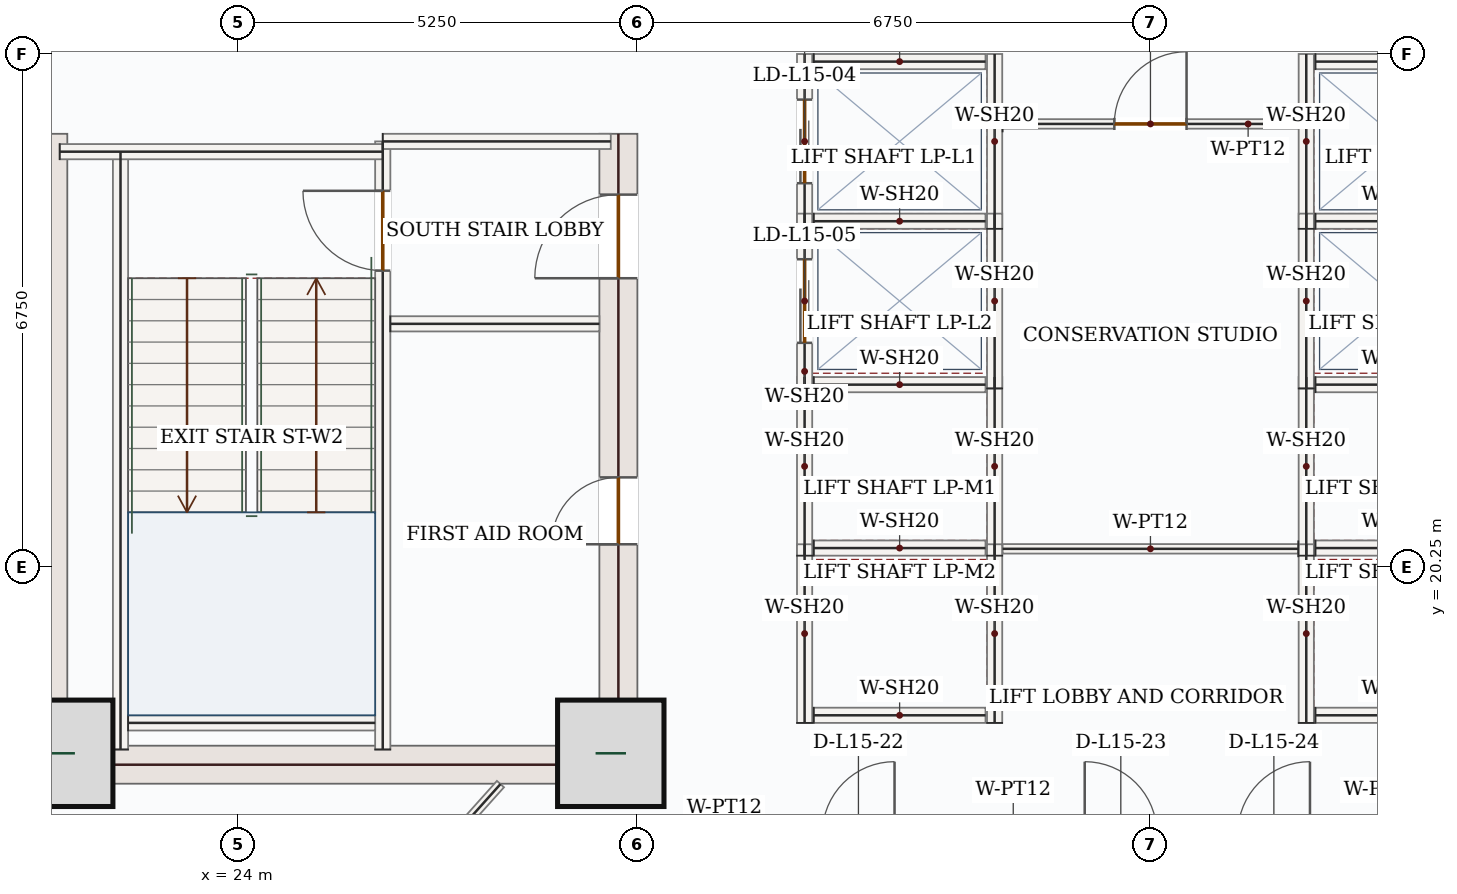
"""IFC4 building model, lengths in metres.
Left out: names, types, materials, properties, quantities, classifications, styles, units other than length and angle.
Written with IfcOpenShell. Run it as: python <this file> out.ifc"""

import sys

from ifc_helpers import new_model, si_unit, direction, frame, frame_2d, origin, origin_2d, place, context, subcontext, project, spatial, rectangle, extrude, source, transform, mapped, element, fill, save


model = new_model("IFC4")
c1 = context("Model", 3, precision=1e-05, world=origin(), true_north=direction((0.0, 1.0)))
c2 = subcontext(c1, "Body", "Model", "MODEL_VIEW")
j1 = project(units=[si_unit("LENGTHUNIT", "METRE"), si_unit("PLANEANGLEUNIT", "RADIAN")], contexts=[c1])
p1 = place(None, origin())
s1 = spatial("IfcSite", under=j1, at=p1, CompositionType="ELEMENT")
p2 = place(p1, origin())
s2 = spatial("IfcBuilding", under=s1, at=p2, CompositionType="ELEMENT")
p3 = place(p2, frame((0.0, 0.0, 71.1)))
s3 = spatial("IfcBuildingStorey", under=s2, at=p3, CompositionType="ELEMENT", Elevation=71.1)
m1 = source(origin(), c2, "Body", "SweptSolid", [
    extrude(rectangle(XDim=8.55, YDim=0.5, at=frame_2d((4.275, 0.0))), origin(), (0.0, 0.0, 1.0), 3.95),
])
p4 = place(p3, frame((21.5, 17.4, 0.0), z_axis=(0.0, 0.0, 1.0), x_axis=(0.0, 1.0, 0.0)))
e1 = element("IfcWall", 1, at=p4, inside=s3, PredefinedType="SHEAR", context=c2, shape_type="MappedRepresentation", body=[
    mapped(m1, transform((0.0, 0.0, 0.0), x_axis=(1.0, 0.0, 0.0), y_axis=(0.0, 1.0, 0.0), z_axis=(0.0, 0.0, 1.0), scale=1.0)),
])
p5 = place(p3, frame((29.0, 17.4, 0.0), z_axis=(0.0, 0.0, 1.0), x_axis=(0.0, 1.0, 0.0)))
e2 = element("IfcWall", 2, at=p5, inside=s3, PredefinedType="SHEAR", context=c2, shape_type="SweptSolid", body=[
    extrude(rectangle(XDim=8.55, YDim=0.5, at=frame_2d((4.275, 0.0))), origin(), (0.0, 0.0, 1.0), 3.95),
])
p6 = place(p5, frame((6.65, 0.0, 0.0)))
e3 = element("IfcOpeningElement", 3, at=p6, cuts=e2, PredefinedType="OPENING", context=c2, shape_type="SweptSolid", body=[
    extrude(rectangle(XDim=1.1, YDim=2.2, at=frame_2d((0.55, 1.1))), frame((0.0, 0.26, 0.0), z_axis=(0.0, -1.0, 0.0), x_axis=(1.0, 0.0, 0.0)), (0.0, 0.0, 1.0), 0.52),
])
p7 = place(p5, frame((3.15, 0.0, 0.0)))
e4 = element("IfcOpeningElement", 4, at=p7, cuts=e2, PredefinedType="OPENING", context=c2, shape_type="SweptSolid", body=[
    extrude(rectangle(XDim=0.88, YDim=2.1, at=frame_2d((0.44, 1.05))), frame((0.0, 0.26, 0.0), z_axis=(0.0, -1.0, 0.0), x_axis=(1.0, 0.0, 0.0)), (0.0, 0.0, 1.0), 0.52),
])
m2 = source(origin(), c2, "Body", "SweptSolid", [
    extrude(rectangle(XDim=7.0, YDim=0.5, at=frame_2d((3.5, 0.0))), origin(), (0.0, 0.0, 1.0), 3.95),
])
p8 = place(p3, frame((21.75, 17.65, 0.0), z_axis=(0.0, 0.0, 1.0), x_axis=(1.0, 0.0, 0.0)))
e5 = element("IfcWall", 5, at=p8, inside=s3, PredefinedType="SHEAR", context=c2, shape_type="MappedRepresentation", body=[
    mapped(m2, transform((0.0, 0.0, 0.0), x_axis=(1.0, 0.0, 0.0), y_axis=(0.0, 1.0, 0.0), z_axis=(0.0, 0.0, 1.0), scale=1.0)),
])
m3 = source(origin(), c2, "Body", "SweptSolid", [
    extrude(rectangle(XDim=1.4, YDim=1.4, at=origin_2d()), origin(), (0.0, 0.0, 1.0), 4.2),
])
for number, where, z_axis, x_axis in (
    (6, (21.65, 17.8, 0.0), (0.0, 0.0, 1.0), (1.0, 0.0, 0.0)),
    (7, (28.9, 17.8, 0.0), (0.0, 0.0, 1.0), (1.0, 0.0, 0.0)),
):
    element("IfcColumn", number, at=place(p3, frame(where, z_axis=z_axis, x_axis=x_axis)), inside=s3, PredefinedType="COLUMN", context=c2, shape_type="MappedRepresentation", body=[
        mapped(m3, transform((0.0, 0.0, 0.0), x_axis=(1.0, 0.0, 0.0), y_axis=(0.0, 1.0, 0.0), z_axis=(0.0, 0.0, 1.0), scale=1.0)),
    ])
p9 = place(p3, frame((22.658, 14.74, 0.0), z_axis=(0.0, 0.0, 1.0), x_axis=(-0.707106781187, 0.707106781187, 0.0)))
e8 = element("IfcWall", 8, at=p9, inside=s3, PredefinedType="SOLIDWALL", context=c2, shape_type="SweptSolid", body=[
    extrude(rectangle(XDim=5.258, YDim=0.32, at=frame_2d((2.629, 0.0))), origin(), (0.0, 0.0, 1.0), 3.95),
])
p10 = place(p9, frame((1.429, 0.0, 0.85)))
e9 = element("IfcOpeningElement", 9, at=p10, cuts=e8, PredefinedType="OPENING", context=c2, shape_type="SweptSolid", body=[
    extrude(rectangle(XDim=2.4, YDim=1.8, at=frame_2d((1.2, 0.9))), frame((0.0, 0.17, 0.0), z_axis=(0.0, -1.0, 0.0), x_axis=(1.0, 0.0, 0.0)), (0.0, 0.0, 1.0), 0.34),
])
m4 = source(origin(), c2, "Body", "SweptSolid", [
    extrude(rectangle(XDim=7.87, YDim=0.2, at=frame_2d((3.935, 0.0))), origin(), (0.0, 0.0, 1.0), 3.95),
])
p11 = place(p3, frame((22.45, 17.85, 0.0), z_axis=(0.0, 0.0, 1.0), x_axis=(0.0, 1.0, 0.0)))
e10 = element("IfcWall", 10, at=p11, inside=s3, PredefinedType="SOLIDWALL", context=c2, shape_type="MappedRepresentation", body=[
    mapped(m4, transform((0.0, 0.0, 0.0), x_axis=(1.0, 0.0, 0.0), y_axis=(0.0, 1.0, 0.0), z_axis=(0.0, 0.0, 1.0), scale=1.0)),
])
p12 = place(p3, frame((25.9, 17.85, 0.0), z_axis=(0.0, 0.0, 1.0), x_axis=(0.0, 1.0, 0.0)))
e11 = element("IfcWall", 11, at=p12, inside=s3, PredefinedType="SOLIDWALL", context=c2, shape_type="SweptSolid", body=[
    extrude(rectangle(XDim=8.0, YDim=0.2, at=frame_2d((4.0, 0.0))), origin(), (0.0, 0.0, 1.0), 3.95),
])
p13 = place(p12, frame((6.3, 0.0, 0.0)))
e12 = element("IfcOpeningElement", 12, at=p13, cuts=e11, PredefinedType="OPENING", context=c2, shape_type="SweptSolid", body=[
    extrude(rectangle(XDim=1.05, YDim=2.15, at=frame_2d((0.525, 1.075))), frame((0.0, 0.11, 0.0), z_axis=(0.0, -1.0, 0.0), x_axis=(1.0, 0.0, 0.0)), (0.0, 0.0, 1.0), 0.22),
])
m5 = source(origin(), c2, "Body", "SweptSolid", [
    extrude(rectangle(XDim=4.25, YDim=0.2, at=frame_2d((2.125, 0.0))), origin(), (0.0, 0.0, 1.0), 3.95),
])
p14 = place(p3, frame((21.65, 25.715, 0.0), z_axis=(0.0, 0.0, 1.0), x_axis=(1.0, 0.0, 0.0)))
e13 = element("IfcWall", 13, at=p14, inside=s3, PredefinedType="SOLIDWALL", context=c2, shape_type="MappedRepresentation", body=[
    mapped(m5, transform((0.0, 0.0, 0.0), x_axis=(1.0, 0.0, 0.0), y_axis=(0.0, 1.0, 0.0), z_axis=(0.0, 0.0, 1.0), scale=1.0)),
])
m6 = source(origin(), c2, "Body", "SweptSolid", [
    extrude(rectangle(XDim=3.0, YDim=0.2, at=frame_2d((1.5, 0.0))), origin(), (0.0, 0.0, 1.0), 3.95),
])
p15 = place(p3, frame((25.9, 25.85, 0.0), z_axis=(0.0, 0.0, 1.0), x_axis=(1.0, 0.0, 0.0)))
e14 = element("IfcWall", 14, at=p15, inside=s3, PredefinedType="SOLIDWALL", context=c2, shape_type="MappedRepresentation", body=[
    mapped(m6, transform((0.0, 0.0, 0.0), x_axis=(1.0, 0.0, 0.0), y_axis=(0.0, 1.0, 0.0), z_axis=(0.0, 0.0, 1.0), scale=1.0)),
])
m7 = source(origin(), c2, "Body", "SweptSolid", [
    extrude(rectangle(XDim=3.25, YDim=0.2, at=frame_2d((1.625, 0.0))), origin(), (0.0, 0.0, 1.0), 3.95),
])
p16 = place(p3, frame((22.55, 18.2, 0.0), z_axis=(0.0, 0.0, 1.0), x_axis=(1.0, 0.0, 0.0)))
e15 = element("IfcWall", 15, at=p16, inside=s3, PredefinedType="SOLIDWALL", context=c2, shape_type="MappedRepresentation", body=[
    mapped(m7, transform((0.0, 0.0, 0.0), x_axis=(1.0, 0.0, 0.0), y_axis=(0.0, 1.0, 0.0), z_axis=(0.0, 0.0, 1.0), scale=1.0)),
])
m8 = source(origin(), c2, "Body", "SweptSolid", [
    extrude(rectangle(XDim=2.75, YDim=0.2, at=frame_2d((1.375, 0.0))), origin(), (0.0, 0.0, 1.0), 3.95),
])
p17 = place(p3, frame((26.0, 23.45, 0.0), z_axis=(0.0, 0.0, 1.0), x_axis=(1.0, 0.0, 0.0)))
e16 = element("IfcWall", 16, at=p17, inside=s3, PredefinedType="SOLIDWALL", context=c2, shape_type="MappedRepresentation", body=[
    mapped(m8, transform((0.0, 0.0, 0.0), x_axis=(1.0, 0.0, 0.0), y_axis=(0.0, 1.0, 0.0), z_axis=(0.0, 0.0, 1.0), scale=1.0)),
])
m9 = source(origin(), c2, "Body", "SweptSolid", [
    extrude(rectangle(XDim=2.35, YDim=0.2, at=frame_2d((1.175, 0.0))), origin(), (0.0, 0.0, 1.0), 3.95),
])
for number, where, z_axis, x_axis in (
    (17, (31.45, 20.4, 0.0), (0.0, 0.0, 1.0), (0.0, 1.0, 0.0)),
    (18, (33.95, 20.4, 0.0), (0.0, 0.0, 1.0), (0.0, 1.0, 0.0)),
):
    element("IfcWall", number, at=place(p3, frame(where, z_axis=z_axis, x_axis=x_axis)), inside=s3, PredefinedType="SOLIDWALL", context=c2, shape_type="MappedRepresentation", body=[
        mapped(m9, transform((0.0, 0.0, 0.0), x_axis=(1.0, 0.0, 0.0), y_axis=(0.0, 1.0, 0.0), z_axis=(0.0, 0.0, 1.0), scale=1.0)),
    ])
m10 = source(origin(), c2, "Body", "SweptSolid", [
    extrude(rectangle(XDim=2.26, YDim=0.2, at=frame_2d((1.13, 0.0))), origin(), (0.0, 0.0, 1.0), 3.95),
])
for number, where, z_axis, x_axis in (
    (19, (31.57, 20.5, 0.0), (0.0, 0.0, 1.0), (1.0, 0.0, 0.0)),
    (20, (31.57, 22.65, 0.0), (0.0, 0.0, 1.0), (1.0, 0.0, 0.0)),
):
    element("IfcWall", number, at=place(p3, frame(where, z_axis=z_axis, x_axis=x_axis)), inside=s3, PredefinedType="SOLIDWALL", context=c2, shape_type="MappedRepresentation", body=[
        mapped(m10, transform((0.0, 0.0, 0.0), x_axis=(1.0, 0.0, 0.0), y_axis=(0.0, 1.0, 0.0), z_axis=(0.0, 0.0, 1.0), scale=1.0)),
    ])
for number, where, z_axis, x_axis in (
    (21, (31.45, 18.2, 0.0), (0.0, 0.0, 1.0), (0.0, 1.0, 0.0)),
    (22, (33.95, 18.2, 0.0), (0.0, 0.0, 1.0), (0.0, 1.0, 0.0)),
):
    element("IfcWall", number, at=place(p3, frame(where, z_axis=z_axis, x_axis=x_axis)), inside=s3, PredefinedType="SOLIDWALL", context=c2, shape_type="MappedRepresentation", body=[
        mapped(m9, transform((0.0, 0.0, 0.0), x_axis=(1.0, 0.0, 0.0), y_axis=(0.0, 1.0, 0.0), z_axis=(0.0, 0.0, 1.0), scale=1.0)),
    ])
p18 = place(p3, frame((31.57, 18.3, 0.0), z_axis=(0.0, 0.0, 1.0), x_axis=(1.0, 0.0, 0.0)))
e23 = element("IfcWall", 23, at=p18, inside=s3, PredefinedType="SOLIDWALL", context=c2, shape_type="MappedRepresentation", body=[
    mapped(m10, transform((0.0, 0.0, 0.0), x_axis=(1.0, 0.0, 0.0), y_axis=(0.0, 1.0, 0.0), z_axis=(0.0, 0.0, 1.0), scale=1.0)),
])
p19 = place(p3, frame((38.05, 20.4, 0.0), z_axis=(0.0, 0.0, 1.0), x_axis=(0.0, 1.0, 0.0)))
e24 = element("IfcWall", 24, at=p19, inside=s3, PredefinedType="SOLIDWALL", context=c2, shape_type="MappedRepresentation", body=[
    mapped(m9, transform((0.0, 0.0, 0.0), x_axis=(1.0, 0.0, 0.0), y_axis=(0.0, 1.0, 0.0), z_axis=(0.0, 0.0, 1.0), scale=1.0)),
])
for number, where, z_axis, x_axis in (
    (25, (38.17, 20.5, 0.0), (0.0, 0.0, 1.0), (1.0, 0.0, 0.0)),
    (26, (38.17, 22.65, 0.0), (0.0, 0.0, 1.0), (1.0, 0.0, 0.0)),
):
    element("IfcWall", number, at=place(p3, frame(where, z_axis=z_axis, x_axis=x_axis)), inside=s3, PredefinedType="SOLIDWALL", context=c2, shape_type="MappedRepresentation", body=[
        mapped(m10, transform((0.0, 0.0, 0.0), x_axis=(1.0, 0.0, 0.0), y_axis=(0.0, 1.0, 0.0), z_axis=(0.0, 0.0, 1.0), scale=1.0)),
    ])
p20 = place(p3, frame((38.05, 18.2, 0.0), z_axis=(0.0, 0.0, 1.0), x_axis=(0.0, 1.0, 0.0)))
e27 = element("IfcWall", 27, at=p20, inside=s3, PredefinedType="SOLIDWALL", context=c2, shape_type="MappedRepresentation", body=[
    mapped(m9, transform((0.0, 0.0, 0.0), x_axis=(1.0, 0.0, 0.0), y_axis=(0.0, 1.0, 0.0), z_axis=(0.0, 0.0, 1.0), scale=1.0)),
])
p21 = place(p3, frame((38.17, 18.3, 0.0), z_axis=(0.0, 0.0, 1.0), x_axis=(1.0, 0.0, 0.0)))
e28 = element("IfcWall", 28, at=p21, inside=s3, PredefinedType="SOLIDWALL", context=c2, shape_type="MappedRepresentation", body=[
    mapped(m10, transform((0.0, 0.0, 0.0), x_axis=(1.0, 0.0, 0.0), y_axis=(0.0, 1.0, 0.0), z_axis=(0.0, 0.0, 1.0), scale=1.0)),
])
p22 = place(p3, frame((31.45, 24.7, 0.0), z_axis=(0.0, 0.0, 1.0), x_axis=(0.0, 1.0, 0.0)))
e29 = element("IfcWall", 29, at=p22, inside=s3, PredefinedType="SOLIDWALL", context=c2, shape_type="SweptSolid", body=[
    extrude(rectangle(XDim=2.3, YDim=0.2, at=frame_2d((1.15, 0.0))), origin(), (0.0, 0.0, 1.0), 3.95),
])
p23 = place(p22, frame((0.6, 0.0, 0.0)))
e30 = element("IfcOpeningElement", 30, at=p23, cuts=e29, PredefinedType="OPENING", context=c2, shape_type="SweptSolid", body=[
    extrude(rectangle(XDim=1.1, YDim=2.15, at=frame_2d((0.55, 1.075))), frame((0.0, 0.11, 0.0), z_axis=(0.0, -1.0, 0.0), x_axis=(1.0, 0.0, 0.0)), (0.0, 0.0, 1.0), 0.22),
])
m11 = source(origin(), c2, "Body", "SweptSolid", [
    extrude(rectangle(XDim=2.3, YDim=0.2, at=frame_2d((1.15, 0.0))), origin(), (0.0, 0.0, 1.0), 3.95),
])
p24 = place(p3, frame((33.95, 24.7, 0.0), z_axis=(0.0, 0.0, 1.0), x_axis=(0.0, 1.0, 0.0)))
e31 = element("IfcWall", 31, at=p24, inside=s3, PredefinedType="SOLIDWALL", context=c2, shape_type="MappedRepresentation", body=[
    mapped(m11, transform((0.0, 0.0, 0.0), x_axis=(1.0, 0.0, 0.0), y_axis=(0.0, 1.0, 0.0), z_axis=(0.0, 0.0, 1.0), scale=1.0)),
])
for number, where, z_axis, x_axis in (
    (32, (31.57, 24.8, 0.0), (0.0, 0.0, 1.0), (1.0, 0.0, 0.0)),
    (33, (31.57, 26.9, 0.0), (0.0, 0.0, 1.0), (1.0, 0.0, 0.0)),
):
    element("IfcWall", number, at=place(p3, frame(where, z_axis=z_axis, x_axis=x_axis)), inside=s3, PredefinedType="SOLIDWALL", context=c2, shape_type="MappedRepresentation", body=[
        mapped(m10, transform((0.0, 0.0, 0.0), x_axis=(1.0, 0.0, 0.0), y_axis=(0.0, 1.0, 0.0), z_axis=(0.0, 0.0, 1.0), scale=1.0)),
    ])
p25 = place(p3, frame((31.45, 22.6, 0.0), z_axis=(0.0, 0.0, 1.0), x_axis=(0.0, 1.0, 0.0)))
e34 = element("IfcWall", 34, at=p25, inside=s3, PredefinedType="SOLIDWALL", context=c2, shape_type="SweptSolid", body=[
    extrude(rectangle(XDim=2.3, YDim=0.2, at=frame_2d((1.15, 0.0))), origin(), (0.0, 0.0, 1.0), 3.95),
])
p26 = place(p25, frame((0.6, 0.0, 0.0)))
e35 = element("IfcOpeningElement", 35, at=p26, cuts=e34, PredefinedType="OPENING", context=c2, shape_type="SweptSolid", body=[
    extrude(rectangle(XDim=1.1, YDim=2.15, at=frame_2d((0.55, 1.075))), frame((0.0, 0.11, 0.0), z_axis=(0.0, -1.0, 0.0), x_axis=(1.0, 0.0, 0.0)), (0.0, 0.0, 1.0), 0.22),
])
m12 = source(origin(), c2, "Body", "SweptSolid", [
    extrude(rectangle(XDim=2.3, YDim=0.2, at=frame_2d((1.15, 0.0))), origin(), (0.0, 0.0, 1.0), 3.95),
])
p27 = place(p3, frame((33.95, 22.6, 0.0), z_axis=(0.0, 0.0, 1.0), x_axis=(0.0, 1.0, 0.0)))
e36 = element("IfcWall", 36, at=p27, inside=s3, PredefinedType="SOLIDWALL", context=c2, shape_type="MappedRepresentation", body=[
    mapped(m12, transform((0.0, 0.0, 0.0), x_axis=(1.0, 0.0, 0.0), y_axis=(0.0, 1.0, 0.0), z_axis=(0.0, 0.0, 1.0), scale=1.0)),
])
p28 = place(p3, frame((38.05, 24.7, 0.0), z_axis=(0.0, 0.0, 1.0), x_axis=(0.0, 1.0, 0.0)))
e37 = element("IfcWall", 37, at=p28, inside=s3, PredefinedType="SOLIDWALL", context=c2, shape_type="MappedRepresentation", body=[
    mapped(m11, transform((0.0, 0.0, 0.0), x_axis=(1.0, 0.0, 0.0), y_axis=(0.0, 1.0, 0.0), z_axis=(0.0, 0.0, 1.0), scale=1.0)),
])
for number, where, z_axis, x_axis in (
    (38, (38.17, 24.8, 0.0), (0.0, 0.0, 1.0), (1.0, 0.0, 0.0)),
    (39, (38.17, 26.9, 0.0), (0.0, 0.0, 1.0), (1.0, 0.0, 0.0)),
):
    element("IfcWall", number, at=place(p3, frame(where, z_axis=z_axis, x_axis=x_axis)), inside=s3, PredefinedType="SOLIDWALL", context=c2, shape_type="MappedRepresentation", body=[
        mapped(m10, transform((0.0, 0.0, 0.0), x_axis=(1.0, 0.0, 0.0), y_axis=(0.0, 1.0, 0.0), z_axis=(0.0, 0.0, 1.0), scale=1.0)),
    ])
p29 = place(p3, frame((38.05, 22.6, 0.0), z_axis=(0.0, 0.0, 1.0), x_axis=(0.0, 1.0, 0.0)))
e40 = element("IfcWall", 40, at=p29, inside=s3, PredefinedType="SOLIDWALL", context=c2, shape_type="MappedRepresentation", body=[
    mapped(m12, transform((0.0, 0.0, 0.0), x_axis=(1.0, 0.0, 0.0), y_axis=(0.0, 1.0, 0.0), z_axis=(0.0, 0.0, 1.0), scale=1.0)),
])
p30 = place(p3, frame((34.055, 26.08, 0.0), z_axis=(0.0, 0.0, 1.0), x_axis=(1.0, 0.0, 0.0)))
e41 = element("IfcWall", 41, at=p30, inside=s3, PredefinedType="PARTITIONING", context=c2, shape_type="SweptSolid", body=[
    extrude(rectangle(XDim=3.89, YDim=0.125, at=frame_2d((1.945, 0.0))), origin(), (0.0, 0.0, 1.0), 3.95),
])
p31 = place(p30, frame((1.47, 0.0, 0.0)))
e42 = element("IfcOpeningElement", 42, at=p31, cuts=e41, PredefinedType="OPENING", context=c2, shape_type="SweptSolid", body=[
    extrude(rectangle(XDim=0.95, YDim=2.15, at=frame_2d((0.475, 1.075))), frame((0.0, 0.073, 0.0), z_axis=(0.0, -1.0, 0.0), x_axis=(1.0, 0.0, 0.0)), (0.0, 0.0, 1.0), 0.145),
])
m13 = source(origin(), c2, "Body", "SweptSolid", [
    extrude(rectangle(XDim=3.89, YDim=0.125, at=frame_2d((1.945, 0.0))), origin(), (0.0, 0.0, 1.0), 3.95),
])
p32 = place(p3, frame((37.945, 20.49, 0.0), z_axis=(0.0, 0.0, 1.0), x_axis=(-1.0, 0.0, 0.0)))
e43 = element("IfcWall", 43, at=p32, inside=s3, PredefinedType="PARTITIONING", context=c2, shape_type="MappedRepresentation", body=[
    mapped(m13, transform((0.0, 0.0, 0.0), x_axis=(1.0, 0.0, 0.0), y_axis=(0.0, 1.0, 0.0), z_axis=(0.0, 0.0, 1.0), scale=1.0)),
])
m14 = source(origin(), c2, "Body", "SweptSolid", [
    extrude(rectangle(XDim=3.348, YDim=0.125, at=frame_2d((1.674, 0.0))), origin(), (0.0, 0.0, 1.0), 3.95),
])
p33 = place(p3, frame((25.215, 14.901, 0.0), z_axis=(0.0, 0.0, 1.0), x_axis=(0.667206176518, 0.74487308853, 0.0)))
e44 = element("IfcWall", 44, at=p33, inside=s3, PredefinedType="PARTITIONING", context=c2, shape_type="MappedRepresentation", body=[
    mapped(m14, transform((0.0, 0.0, 0.0), x_axis=(1.0, 0.0, 0.0), y_axis=(0.0, 1.0, 0.0), z_axis=(0.0, 0.0, 1.0), scale=1.0)),
])
m15 = source(origin(), c2, "Body", "SweptSolid", [
    extrude(rectangle(XDim=2.4, YDim=1.8, at=frame_2d((1.2, 0.9))), frame((0.0, 0.03, 0.0), z_axis=(0.0, -1.0, 0.0), x_axis=(1.0, 0.0, 0.0)), (0.0, 0.0, 1.0), 0.06),
])
p34 = place(p10, origin())
e45 = element("IfcWindow", 45, at=p34, inside=s3, PartitioningType="DOUBLE_PANEL_VERTICAL", PredefinedType="WINDOW", context=c2, shape_type="MappedRepresentation", body=[
    mapped(m15, transform((0.0, 0.0, 0.0), x_axis=(1.0, 0.0, 0.0), y_axis=(0.0, 1.0, 0.0), z_axis=(0.0, 0.0, 1.0), scale=1.0)),
])
fill(e9, e45)
m16 = source(origin(), c2, "Body", "SweptSolid", [
    extrude(rectangle(XDim=1.05, YDim=2.15, at=frame_2d((0.525, 1.075))), frame((0.0, 0.025, 0.0), z_axis=(0.0, -1.0, 0.0), x_axis=(1.0, 0.0, 0.0)), (0.0, 0.0, 1.0), 0.05),
])
p35 = place(p13, origin())
e46 = element("IfcDoor", 46, at=p35, inside=s3, OperationType="SINGLE_SWING_RIGHT", PredefinedType="DOOR", context=c2, shape_type="MappedRepresentation", body=[
    mapped(m16, transform((0.0, 0.0, 0.0), x_axis=(1.0, 0.0, 0.0), y_axis=(0.0, 1.0, 0.0), z_axis=(0.0, 0.0, 1.0), scale=1.0)),
])
fill(e12, e46)
m17 = source(origin(), c2, "Body", "SweptSolid", [
    extrude(rectangle(XDim=1.1, YDim=2.2, at=frame_2d((0.55, 1.1))), frame((0.0, 0.025, 0.0), z_axis=(0.0, -1.0, 0.0), x_axis=(1.0, 0.0, 0.0)), (0.0, 0.0, 1.0), 0.05),
])
p36 = place(p6, origin())
e47 = element("IfcDoor", 47, at=p36, inside=s3, OperationType="SINGLE_SWING_LEFT", PredefinedType="DOOR", context=c2, shape_type="MappedRepresentation", body=[
    mapped(m17, transform((0.0, 0.0, 0.0), x_axis=(1.0, 0.0, 0.0), y_axis=(0.0, 1.0, 0.0), z_axis=(0.0, 0.0, 1.0), scale=1.0)),
])
fill(e3, e47)
m18 = source(origin(), c2, "Body", "SweptSolid", [
    extrude(rectangle(XDim=0.88, YDim=2.1, at=frame_2d((0.44, 1.05))), frame((0.0, 0.025, 0.0), z_axis=(0.0, -1.0, 0.0), x_axis=(1.0, 0.0, 0.0)), (0.0, 0.0, 1.0), 0.05),
])
p37 = place(p7, origin())
e48 = element("IfcDoor", 48, at=p37, inside=s3, OperationType="SINGLE_SWING_LEFT", PredefinedType="DOOR", context=c2, shape_type="MappedRepresentation", body=[
    mapped(m18, transform((0.0, 0.0, 0.0), x_axis=(1.0, 0.0, 0.0), y_axis=(0.0, 1.0, 0.0), z_axis=(0.0, 0.0, 1.0), scale=1.0)),
])
fill(e4, e48)
m19 = source(origin(), c2, "Body", "SweptSolid", [
    extrude(rectangle(XDim=1.1, YDim=2.15, at=frame_2d((0.55, 1.075))), frame((0.0, 0.025, 0.0), z_axis=(0.0, -1.0, 0.0), x_axis=(1.0, 0.0, 0.0)), (0.0, 0.0, 1.0), 0.05),
])
p38 = place(p23, origin())
e49 = element("IfcDoor", 49, at=p38, inside=s3, OperationType="DOUBLE_DOOR_SLIDING", PredefinedType="DOOR", context=c2, shape_type="MappedRepresentation", body=[
    mapped(m19, transform((0.0, 0.0, 0.0), x_axis=(1.0, 0.0, 0.0), y_axis=(0.0, 1.0, 0.0), z_axis=(0.0, 0.0, 1.0), scale=1.0)),
])
fill(e30, e49)
p39 = place(p26, origin())
e50 = element("IfcDoor", 50, at=p39, inside=s3, OperationType="DOUBLE_DOOR_SLIDING", PredefinedType="DOOR", context=c2, shape_type="MappedRepresentation", body=[
    mapped(m19, transform((0.0, 0.0, 0.0), x_axis=(1.0, 0.0, 0.0), y_axis=(0.0, 1.0, 0.0), z_axis=(0.0, 0.0, 1.0), scale=1.0)),
])
fill(e35, e50)
m20 = source(origin(), c2, "Body", "SweptSolid", [
    extrude(rectangle(XDim=0.95, YDim=2.15, at=frame_2d((0.475, 1.075))), frame((0.0, 0.025, 0.0), z_axis=(0.0, -1.0, 0.0), x_axis=(1.0, 0.0, 0.0)), (0.0, 0.0, 1.0), 0.05),
])
p40 = place(p31, origin())
e51 = element("IfcDoor", 51, at=p40, inside=s3, OperationType="SINGLE_SWING_RIGHT", PredefinedType="DOOR", context=c2, shape_type="MappedRepresentation", body=[
    mapped(m20, transform((0.0, 0.0, 0.0), x_axis=(1.0, 0.0, 0.0), y_axis=(0.0, 1.0, 0.0), z_axis=(0.0, 0.0, 1.0), scale=1.0)),
])
fill(e42, e51)
save(model, sys.argv[1])
